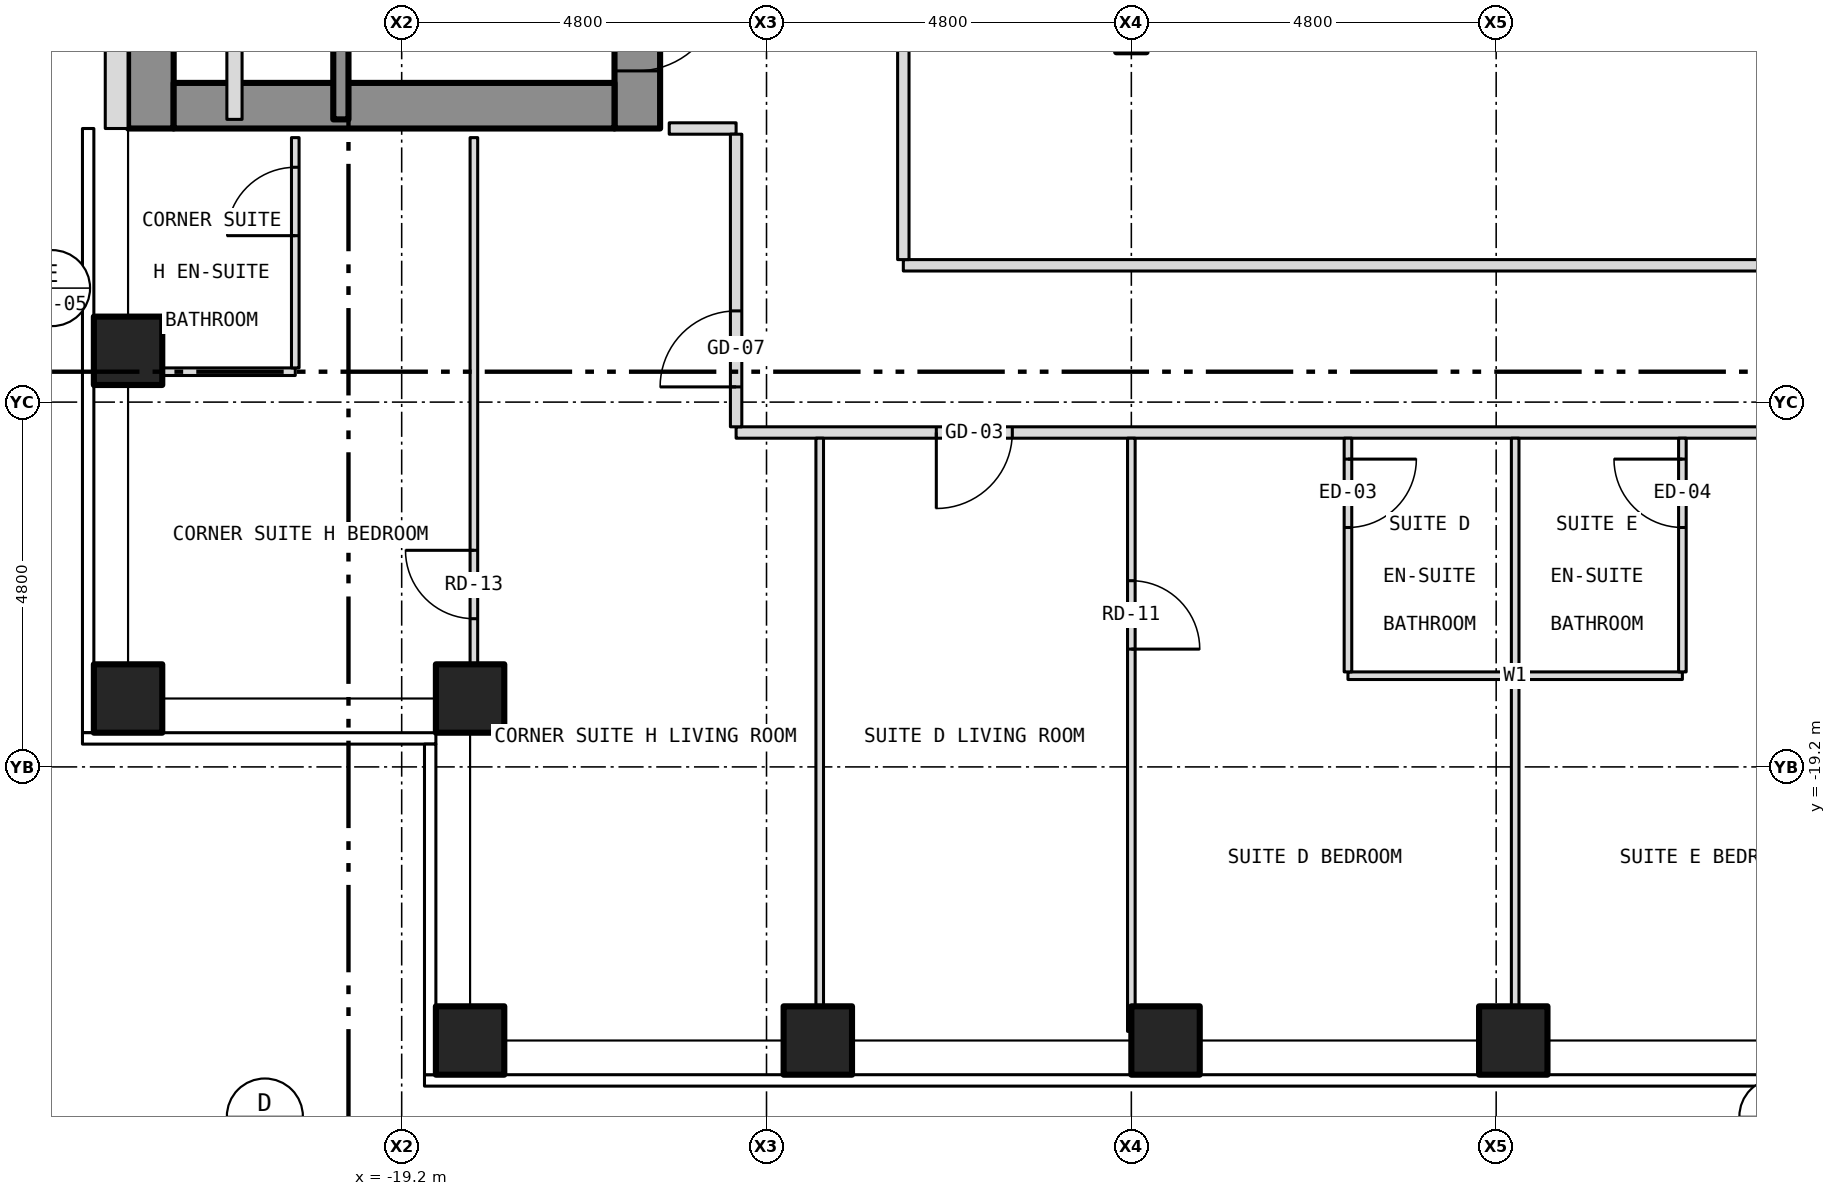
"""IFC4 building model, lengths in metres.
Left out: names, types, materials, properties, quantities, classifications, styles, units other than length and angle.
Written with IfcOpenShell. Run it as: python <this file> out.ifc"""

import sys

from ifc_helpers import new_model, si_unit, direction, frame, frame_2d, origin, origin_2d, place, context, subcontext, project, spatial, rectangle, hollow_rectangle, extrude, element, fill, save


model = new_model("IFC4")
c1 = context("Model", 3, precision=1e-05, world=origin(), true_north=direction((0.0, 1.0)))
c2 = subcontext(c1, "Body", "Model", "MODEL_VIEW")
j1 = project(units=[si_unit("LENGTHUNIT", "METRE"), si_unit("PLANEANGLEUNIT", "RADIAN")], contexts=[c1])
p1 = place(None, origin())
s1 = spatial("IfcSite", under=j1, at=p1, CompositionType="ELEMENT")
p2 = place(p1, origin())
s2 = spatial("IfcBuilding", under=s1, at=p2, CompositionType="ELEMENT")
p3 = place(p2, frame((0.0, 0.0, 103.0)))
s3 = spatial("IfcBuildingStorey", under=s2, at=p3, CompositionType="ELEMENT", Elevation=103.0)
for number, where, z_axis, x_axis in (
    (1, (-18.3, -22.8, -0.15), (0.0, 0.0, 1.0), (1.0, 0.0, 0.0)),
    (2, (-13.725, -22.8, -0.15), (0.0, 0.0, 1.0), (1.0, 0.0, 0.0)),
    (3, (-9.15, -22.8, -0.15), (0.0, 0.0, 1.0), (1.0, 0.0, 0.0)),
    (4, (-4.575, -22.8, -0.15), (0.0, 0.0, 1.0), (1.0, 0.0, 0.0)),
    (5, (-22.8, -18.3, -0.15), (0.0, 0.0, 1.0), (1.0, 0.0, 0.0)),
    (6, (-22.8, -13.725, -0.15), (0.0, 0.0, 1.0), (1.0, 0.0, 0.0)),
    (7, (-18.3, -18.3, -0.15), (0.0, 0.0, 1.0), (1.0, 0.0, 0.0)),
):
    element("IfcColumn", number, at=place(p3, frame(where, z_axis=z_axis, x_axis=x_axis)), inside=s3, PredefinedType="COLUMN", context=c2, shape_type="SweptSolid", body=[
        extrude(hollow_rectangle(XDim=0.9, YDim=0.9, WallThickness=0.05, at=origin_2d()), origin(), (0.0, 0.0, 1.0), 3.5),
    ])
p4 = place(p3, frame((-16.1, -10.8, 0.0), z_axis=(0.0, 0.0, 1.0), x_axis=(0.0, 1.0, 0.0)))
e8 = element("IfcWall", 8, at=p4, inside=s3, PredefinedType="SHEAR", context=c2, shape_type="SweptSolid", body=[
    extrude(rectangle(XDim=21.6, YDim=0.6, at=frame_2d((10.8, 0.0))), origin(), (0.0, 0.0, 1.0), 3.25),
])
p5 = place(p4, frame((9.4, 0.0, 0.0)))
e9 = element("IfcOpeningElement", 9, at=p5, cuts=e8, PredefinedType="OPENING", context=c2, shape_type="SweptSolid", body=[
    extrude(rectangle(XDim=1.1, YDim=2.1, at=frame_2d((0.55, 1.05))), frame((0.0, 0.312, 0.0), z_axis=(0.0, -1.0, 0.0), x_axis=(1.0, 0.0, 0.0)), (0.0, 0.0, 1.0), 0.624),
])
p6 = place(p4, frame((11.5, 0.0, 0.0)))
e10 = element("IfcOpeningElement", 10, at=p6, cuts=e8, PredefinedType="OPENING", context=c2, shape_type="SweptSolid", body=[
    extrude(rectangle(XDim=1.1, YDim=2.1, at=frame_2d((0.55, 1.05))), frame((0.0, 0.312, 0.0), z_axis=(0.0, -1.0, 0.0), x_axis=(1.0, 0.0, 0.0)), (0.0, 0.0, 1.0), 0.624),
])
p7 = place(p4, frame((13.6, 0.0, 0.0)))
e11 = element("IfcOpeningElement", 11, at=p7, cuts=e8, PredefinedType="OPENING", context=c2, shape_type="SweptSolid", body=[
    extrude(rectangle(XDim=1.1, YDim=2.1, at=frame_2d((0.55, 1.05))), frame((0.0, 0.312, 0.0), z_axis=(0.0, -1.0, 0.0), x_axis=(1.0, 0.0, 0.0)), (0.0, 0.0, 1.0), 0.624),
])
p8 = place(p4, frame((15.7, 0.0, 0.0)))
e12 = element("IfcOpeningElement", 12, at=p8, cuts=e8, PredefinedType="OPENING", context=c2, shape_type="SweptSolid", body=[
    extrude(rectangle(XDim=1.1, YDim=2.1, at=frame_2d((0.55, 1.05))), frame((0.0, 0.312, 0.0), z_axis=(0.0, -1.0, 0.0), x_axis=(1.0, 0.0, 0.0)), (0.0, 0.0, 1.0), 0.624),
])
p9 = place(p4, frame((17.8, 0.0, 0.0)))
e13 = element("IfcOpeningElement", 13, at=p9, cuts=e8, PredefinedType="OPENING", context=c2, shape_type="SweptSolid", body=[
    extrude(rectangle(XDim=1.1, YDim=2.1, at=frame_2d((0.55, 1.05))), frame((0.0, 0.312, 0.0), z_axis=(0.0, -1.0, 0.0), x_axis=(1.0, 0.0, 0.0)), (0.0, 0.0, 1.0), 0.624),
])
p10 = place(p4, frame((0.758, 0.0, 0.0)))
e14 = element("IfcOpeningElement", 14, at=p10, cuts=e8, PredefinedType="OPENING", context=c2, shape_type="SweptSolid", body=[
    extrude(rectangle(XDim=1.1, YDim=2.1, at=frame_2d((0.55, 1.05))), frame((0.0, 0.312, 0.0), z_axis=(0.0, -1.0, 0.0), x_axis=(1.0, 0.0, 0.0)), (0.0, 0.0, 1.0), 0.624),
])
p11 = place(p4, frame((7.5, 0.0, 0.0)))
e15 = element("IfcOpeningElement", 15, at=p11, cuts=e8, PredefinedType="OPENING", context=c2, shape_type="SweptSolid", body=[
    extrude(rectangle(XDim=1.1, YDim=2.1, at=frame_2d((0.55, 1.05))), frame((0.0, 0.312, 0.0), z_axis=(0.0, -1.0, 0.0), x_axis=(1.0, 0.0, 0.0)), (0.0, 0.0, 1.0), 0.624),
])
p12 = place(p3, frame((-22.5, -10.8, 0.0), z_axis=(0.0, 0.0, 1.0), x_axis=(0.0, 1.0, 0.0)))
e16 = element("IfcWall", 16, at=p12, inside=s3, PredefinedType="SHEAR", context=c2, shape_type="SweptSolid", body=[
    extrude(rectangle(XDim=21.6, YDim=0.6, at=frame_2d((10.8, 0.0))), origin(), (0.0, 0.0, 1.0), 3.25),
])
p13 = place(p3, frame((-22.2, -10.5, 0.0), z_axis=(0.0, 0.0, 1.0), x_axis=(1.0, 0.0, 0.0)))
e17 = element("IfcWall", 17, at=p13, inside=s3, PredefinedType="SHEAR", context=c2, shape_type="SweptSolid", body=[
    extrude(rectangle(XDim=5.8, YDim=0.6, at=frame_2d((2.9, 0.0))), origin(), (0.0, 0.0, 1.0), 3.25),
])
p14 = place(p3, frame((-22.95, 10.8, 0.0), z_axis=(0.0, 0.0, 1.0), x_axis=(0.0, -1.0, 0.0)))
e18 = element("IfcWall", 18, at=p14, inside=s3, PredefinedType="SOLIDWALL", context=c2, shape_type="SweptSolid", body=[
    extrude(rectangle(XDim=21.6, YDim=0.3, at=frame_2d((10.8, 0.0))), origin(), (0.0, 0.0, 1.0), 3.5),
])
p15 = place(p14, frame((18.05, 0.0, 1.0)))
e19 = element("IfcOpeningElement", 19, at=p15, cuts=e18, PredefinedType="OPENING", context=c2, shape_type="SweptSolid", body=[
    extrude(rectangle(XDim=0.6, YDim=1.5, at=frame_2d((0.3, 0.75))), frame((0.0, 0.162, 0.0), z_axis=(0.0, -1.0, 0.0), x_axis=(1.0, 0.0, 0.0)), (0.0, 0.0, 1.0), 0.324),
])
p16 = place(p3, frame((-6.75, -18.0, 0.0), z_axis=(0.0, 0.0, 1.0), x_axis=(1.0, 0.0, 0.0)))
e20 = element("IfcWall", 20, at=p16, inside=s3, PredefinedType="PARTITIONING", context=c2, shape_type="SweptSolid", body=[
    extrude(rectangle(XDim=4.4, YDim=0.1, at=frame_2d((2.2, 0.0))), origin(), (0.0, 0.0, 1.0), 3.35),
])
p17 = place(p3, frame((-14.8, -14.8, 0.0), z_axis=(0.0, 0.0, 1.0), x_axis=(1.0, 0.0, 0.0)))
e21 = element("IfcWall", 21, at=p17, inside=s3, PredefinedType="PARTITIONING", context=c2, shape_type="SweptSolid", body=[
    extrude(rectangle(XDim=29.6, YDim=0.15, at=frame_2d((14.8, 0.0))), origin(), (0.0, 0.0, 1.0), 3.35),
])
p18 = place(p17, frame((2.634, 0.0, 0.0)))
e22 = element("IfcOpeningElement", 22, at=p18, cuts=e21, PredefinedType="OPENING", context=c2, shape_type="SweptSolid", body=[
    extrude(rectangle(XDim=1.0, YDim=2.1, at=frame_2d((0.5, 1.05))), frame((0.0, 0.087, 0.0), z_axis=(0.0, -1.0, 0.0), x_axis=(1.0, 0.0, 0.0)), (0.0, 0.0, 1.0), 0.174),
])
p19 = place(p17, frame((16.816, 0.0, 0.0)))
e23 = element("IfcOpeningElement", 23, at=p19, cuts=e21, PredefinedType="OPENING", context=c2, shape_type="SweptSolid", body=[
    extrude(rectangle(XDim=1.0, YDim=2.1, at=frame_2d((0.5, 1.05))), frame((0.0, 0.087, 0.0), z_axis=(0.0, -1.0, 0.0), x_axis=(1.0, 0.0, 0.0)), (0.0, 0.0, 1.0), 0.174),
])
p20 = place(p17, frame((22.263, 0.0, 0.0)))
e24 = element("IfcOpeningElement", 24, at=p20, cuts=e21, PredefinedType="OPENING", context=c2, shape_type="SweptSolid", body=[
    extrude(rectangle(XDim=1.0, YDim=2.1, at=frame_2d((0.5, 1.05))), frame((0.0, 0.087, 0.0), z_axis=(0.0, -1.0, 0.0), x_axis=(1.0, 0.0, 0.0)), (0.0, 0.0, 1.0), 0.174),
])
p21 = place(p17, frame((26.837, 0.0, 0.0)))
e25 = element("IfcOpeningElement", 25, at=p21, cuts=e21, PredefinedType="OPENING", context=c2, shape_type="SweptSolid", body=[
    extrude(rectangle(XDim=1.0, YDim=2.1, at=frame_2d((0.5, 1.05))), frame((0.0, 0.087, 0.0), z_axis=(0.0, -1.0, 0.0), x_axis=(1.0, 0.0, 0.0)), (0.0, 0.0, 1.0), 0.174),
])
p22 = place(p3, frame((-22.68, -14.0, 0.0), z_axis=(0.0, 0.0, 1.0), x_axis=(1.0, 0.0, 0.0)))
e26 = element("IfcWall", 26, at=p22, inside=s3, PredefinedType="PARTITIONING", context=c2, shape_type="SweptSolid", body=[
    extrude(rectangle(XDim=2.08, YDim=0.1, at=frame_2d((1.04, 0.0))), origin(), (0.0, 0.0, 1.0), 3.35),
])
p23 = place(p3, frame((-12.6, -12.6, 0.0), z_axis=(0.0, 0.0, 1.0), x_axis=(1.0, 0.0, 0.0)))
e27 = element("IfcWall", 27, at=p23, inside=s3, PredefinedType="PARTITIONING", context=c2, shape_type="SweptSolid", body=[
    extrude(rectangle(XDim=25.2, YDim=0.15, at=frame_2d((12.6, 0.0))), origin(), (0.0, 0.0, 1.0), 3.35),
])
p24 = place(p23, frame((12.15, 0.0, 0.0)))
e28 = element("IfcOpeningElement", 28, at=p24, cuts=e27, PredefinedType="OPENING", context=c2, shape_type="SweptSolid", body=[
    extrude(rectangle(XDim=0.9, YDim=2.1, at=frame_2d((0.45, 1.05))), frame((0.0, 0.087, 0.0), z_axis=(0.0, -1.0, 0.0), x_axis=(1.0, 0.0, 0.0)), (0.0, 0.0, 1.0), 0.174),
])
p25 = place(p3, frame((-15.68, -10.8, 0.0), z_axis=(0.0, 0.0, 1.0), x_axis=(1.0, 0.0, 0.0)))
e29 = element("IfcWall", 29, at=p25, inside=s3, PredefinedType="PARTITIONING", context=c2, shape_type="SweptSolid", body=[
    extrude(rectangle(XDim=0.88, YDim=0.15, at=frame_2d((0.44, 0.0))), origin(), (0.0, 0.0, 1.0), 3.35),
])
p26 = place(p3, frame((-21.4, -10.68, 0.0), z_axis=(0.0, 0.0, 1.0), x_axis=(0.0, 1.0, 0.0)))
e30 = element("IfcWall", 30, at=p26, inside=s3, PredefinedType="PARTITIONING", context=c2, shape_type="SweptSolid", body=[
    extrude(rectangle(XDim=8.68, YDim=0.2, at=frame_2d((4.34, 0.0))), origin(), (0.0, 0.0, 1.0), 3.25),
])
p27 = place(p26, frame((3.88, 0.0, 0.0)))
e31 = element("IfcOpeningElement", 31, at=p27, cuts=e30, PredefinedType="OPENING", context=c2, shape_type="SweptSolid", body=[
    extrude(rectangle(XDim=0.9, YDim=2.1, at=frame_2d((0.45, 1.05))), frame((0.0, 0.112, 0.0), z_axis=(0.0, -1.0, 0.0), x_axis=(1.0, 0.0, 0.0)), (0.0, 0.0, 1.0), 0.224),
])
p28 = place(p3, frame((-20.6, -13.95, 0.0), z_axis=(0.0, 0.0, 1.0), x_axis=(0.0, 1.0, 0.0)))
e32 = element("IfcWall", 32, at=p28, inside=s3, PredefinedType="PARTITIONING", context=c2, shape_type="SweptSolid", body=[
    extrude(rectangle(XDim=3.03, YDim=0.1, at=frame_2d((1.515, 0.0))), origin(), (0.0, 0.0, 1.0), 3.35),
])
p29 = place(p28, frame((1.74, 0.0, 0.0)))
e33 = element("IfcOpeningElement", 33, at=p29, cuts=e32, PredefinedType="OPENING", context=c2, shape_type="SweptSolid", body=[
    extrude(rectangle(XDim=0.9, YDim=2.1, at=frame_2d((0.45, 1.05))), frame((0.0, 0.062, 0.0), z_axis=(0.0, -1.0, 0.0), x_axis=(1.0, 0.0, 0.0)), (0.0, 0.0, 1.0), 0.124),
])
p30 = place(p3, frame((-20.0, -10.68, 0.0), z_axis=(0.0, 0.0, 1.0), x_axis=(0.0, 1.0, 0.0)))
e34 = element("IfcWall", 34, at=p30, inside=s3, PredefinedType="SHEAR", context=c2, shape_type="SweptSolid", body=[
    extrude(rectangle(XDim=6.98, YDim=0.2, at=frame_2d((3.49, 0.0))), origin(), (0.0, 0.0, 1.0), 3.25),
])
p31 = place(p3, frame((-18.25, -18.191, 0.0), z_axis=(0.0, 0.0, 1.0), x_axis=(0.0, 1.0, 0.0)))
e35 = element("IfcWall", 35, at=p31, inside=s3, PredefinedType="PARTITIONING", context=c2, shape_type="SweptSolid", body=[
    extrude(rectangle(XDim=7.271, YDim=0.1, at=frame_2d((3.635, 0.0))), origin(), (0.0, 0.0, 1.0), 3.35),
])
p32 = place(p31, frame((0.941, 0.0, 0.0)))
e36 = element("IfcOpeningElement", 36, at=p32, cuts=e35, PredefinedType="OPENING", context=c2, shape_type="SweptSolid", body=[
    extrude(rectangle(XDim=0.9, YDim=2.1, at=frame_2d((0.45, 1.05))), frame((0.0, 0.062, 0.0), z_axis=(0.0, -1.0, 0.0), x_axis=(1.0, 0.0, 0.0)), (0.0, 0.0, 1.0), 0.124),
])
p33 = place(p3, frame((-14.8, -14.725, 0.0), z_axis=(0.0, 0.0, 1.0), x_axis=(0.0, 1.0, 0.0)))
e37 = element("IfcWall", 37, at=p33, inside=s3, PredefinedType="PARTITIONING", context=c2, shape_type="SweptSolid", body=[
    extrude(rectangle(XDim=3.85, YDim=0.15, at=frame_2d((1.925, 0.0))), origin(), (0.0, 0.0, 1.0), 3.35),
])
p34 = place(p33, frame((0.525, 0.0, 0.0)))
e38 = element("IfcOpeningElement", 38, at=p34, cuts=e37, PredefinedType="OPENING", context=c2, shape_type="SweptSolid", body=[
    extrude(rectangle(XDim=1.0, YDim=2.1, at=frame_2d((0.5, 1.05))), frame((0.0, 0.087, 0.0), z_axis=(0.0, -1.0, 0.0), x_axis=(1.0, 0.0, 0.0)), (0.0, 0.0, 1.0), 0.174),
])
p35 = place(p3, frame((-13.7, -22.68, 0.0), z_axis=(0.0, 0.0, 1.0), x_axis=(0.0, 1.0, 0.0)))
e39 = element("IfcWall", 39, at=p35, inside=s3, PredefinedType="PARTITIONING", context=c2, shape_type="SweptSolid", body=[
    extrude(rectangle(XDim=7.805, YDim=0.1, at=frame_2d((3.902, 0.0))), origin(), (0.0, 0.0, 1.0), 3.35),
])
p36 = place(p3, frame((-12.6, -12.525, 0.0), z_axis=(0.0, 0.0, 1.0), x_axis=(0.0, 1.0, 0.0)))
e40 = element("IfcWall", 40, at=p36, inside=s3, PredefinedType="PARTITIONING", context=c2, shape_type="SweptSolid", body=[
    extrude(rectangle(XDim=10.525, YDim=0.15, at=frame_2d((5.262, 0.0))), origin(), (0.0, 0.0, 1.0), 3.35),
])
p37 = place(p3, frame((-9.6, -22.68, 0.0), z_axis=(0.0, 0.0, 1.0), x_axis=(0.0, 1.0, 0.0)))
e41 = element("IfcWall", 41, at=p37, inside=s3, PredefinedType="PARTITIONING", context=c2, shape_type="SweptSolid", body=[
    extrude(rectangle(XDim=0.33, YDim=0.1, at=frame_2d((0.165, 0.0))), origin(), (0.0, 0.0, 1.0), 3.35),
])
p38 = place(p3, frame((-9.6, -22.35, 0.0), z_axis=(0.0, 0.0, 1.0), x_axis=(0.0, 1.0, 0.0)))
e42 = element("IfcWall", 42, at=p38, inside=s3, PredefinedType="PARTITIONING", context=c2, shape_type="SweptSolid", body=[
    extrude(rectangle(XDim=7.475, YDim=0.1, at=frame_2d((3.738, 0.0))), origin(), (0.0, 0.0, 1.0), 2.728),
])
p39 = place(p38, frame((4.7, 0.0, 0.0)))
e43 = element("IfcOpeningElement", 43, at=p39, cuts=e42, PredefinedType="OPENING", context=c2, shape_type="SweptSolid", body=[
    extrude(rectangle(XDim=0.9, YDim=2.1, at=frame_2d((0.45, 1.05))), frame((0.0, 0.062, 0.0), z_axis=(0.0, -1.0, 0.0), x_axis=(1.0, 0.0, 0.0)), (0.0, 0.0, 1.0), 0.124),
])
p40 = place(p3, frame((-6.75, -17.95, 0.0), z_axis=(0.0, 0.0, 1.0), x_axis=(0.0, 1.0, 0.0)))
e44 = element("IfcWall", 44, at=p40, inside=s3, PredefinedType="PARTITIONING", context=c2, shape_type="SweptSolid", body=[
    extrude(rectangle(XDim=3.075, YDim=0.1, at=frame_2d((1.538, 0.0))), origin(), (0.0, 0.0, 1.0), 3.35),
])
p41 = place(p40, frame((1.9, 0.0, 0.0)))
e45 = element("IfcOpeningElement", 45, at=p41, cuts=e44, PredefinedType="OPENING", context=c2, shape_type="SweptSolid", body=[
    extrude(rectangle(XDim=0.9, YDim=2.1, at=frame_2d((0.45, 1.05))), frame((0.0, 0.062, 0.0), z_axis=(0.0, -1.0, 0.0), x_axis=(1.0, 0.0, 0.0)), (0.0, 0.0, 1.0), 0.124),
])
p42 = place(p3, frame((-4.55, -22.68, 0.0), z_axis=(0.0, 0.0, 1.0), x_axis=(0.0, 1.0, 0.0)))
e46 = element("IfcWall", 46, at=p42, inside=s3, PredefinedType="PARTITIONING", context=c2, shape_type="SweptSolid", body=[
    extrude(rectangle(XDim=4.63, YDim=0.1, at=frame_2d((2.315, 0.0))), origin(), (0.0, 0.0, 1.0), 3.35),
])
p43 = place(p3, frame((-4.55, -17.95, 0.0), z_axis=(0.0, 0.0, 1.0), x_axis=(0.0, 1.0, 0.0)))
e47 = element("IfcWall", 47, at=p43, inside=s3, PredefinedType="PARTITIONING", context=c2, shape_type="SweptSolid", body=[
    extrude(rectangle(XDim=3.075, YDim=0.1, at=frame_2d((1.538, 0.0))), origin(), (0.0, 0.0, 1.0), 3.35),
])
p44 = place(p3, frame((-2.35, -17.95, 0.0), z_axis=(0.0, 0.0, 1.0), x_axis=(0.0, 1.0, 0.0)))
e48 = element("IfcWall", 48, at=p44, inside=s3, PredefinedType="PARTITIONING", context=c2, shape_type="SweptSolid", body=[
    extrude(rectangle(XDim=3.075, YDim=0.1, at=frame_2d((1.538, 0.0))), origin(), (0.0, 0.0, 1.0), 3.35),
])
p45 = place(p44, frame((1.9, 0.0, 0.0)))
e49 = element("IfcOpeningElement", 49, at=p45, cuts=e48, PredefinedType="OPENING", context=c2, shape_type="SweptSolid", body=[
    extrude(rectangle(XDim=0.9, YDim=2.1, at=frame_2d((0.45, 1.05))), frame((0.0, 0.062, 0.0), z_axis=(0.0, -1.0, 0.0), x_axis=(1.0, 0.0, 0.0)), (0.0, 0.0, 1.0), 0.124),
])
p46 = place(p10, origin())
e50 = element("IfcDoor", 50, at=p46, inside=s3, OperationType="SINGLE_SWING_RIGHT", PredefinedType="DOOR", context=c2, shape_type="SweptSolid", body=[
    extrude(rectangle(XDim=1.1, YDim=2.1, at=frame_2d((0.55, 1.05))), frame((0.0, 0.025, 0.0), z_axis=(0.0, -1.0, 0.0), x_axis=(1.0, 0.0, 0.0)), (0.0, 0.0, 1.0), 0.05),
])
fill(e14, e50)
p47 = place(p18, origin())
e51 = element("IfcDoor", 51, at=p47, inside=s3, OperationType="SINGLE_SWING_LEFT", PredefinedType="DOOR", context=c2, shape_type="SweptSolid", body=[
    extrude(rectangle(XDim=1.0, YDim=2.1, at=frame_2d((0.5, 1.05))), frame((0.0, 0.025, 0.0), z_axis=(0.0, -1.0, 0.0), x_axis=(1.0, 0.0, 0.0)), (0.0, 0.0, 1.0), 0.05),
])
fill(e22, e51)
p48 = place(p39, origin())
e52 = element("IfcDoor", 52, at=p48, inside=s3, OperationType="SINGLE_SWING_LEFT", PredefinedType="DOOR", context=c2, shape_type="SweptSolid", body=[
    extrude(rectangle(XDim=0.9, YDim=2.1, at=frame_2d((0.45, 1.05))), frame((0.0, 0.025, 0.0), z_axis=(0.0, -1.0, 0.0), x_axis=(1.0, 0.0, 0.0)), (0.0, 0.0, 1.0), 0.05),
])
fill(e43, e52)
p49 = place(p41, origin())
e53 = element("IfcDoor", 53, at=p49, inside=s3, OperationType="SINGLE_SWING_RIGHT", PredefinedType="DOOR", context=c2, shape_type="SweptSolid", body=[
    extrude(rectangle(XDim=0.9, YDim=2.1, at=frame_2d((0.45, 1.05))), frame((0.0, 0.025, 0.0), z_axis=(0.0, -1.0, 0.0), x_axis=(1.0, 0.0, 0.0)), (0.0, 0.0, 1.0), 0.05),
])
fill(e45, e53)
p50 = place(p45, origin())
e54 = element("IfcDoor", 54, at=p50, inside=s3, OperationType="SINGLE_SWING_RIGHT", PredefinedType="DOOR", context=c2, shape_type="SweptSolid", body=[
    extrude(rectangle(XDim=0.9, YDim=2.1, at=frame_2d((0.45, 1.05))), frame((0.0, 0.025, 0.0), z_axis=(0.0, -1.0, 0.0), x_axis=(1.0, 0.0, 0.0)), (0.0, 0.0, 1.0), 0.05),
])
fill(e49, e54)
p51 = place(p34, origin())
e55 = element("IfcDoor", 55, at=p51, inside=s3, OperationType="SINGLE_SWING_LEFT", PredefinedType="DOOR", context=c2, shape_type="SweptSolid", body=[
    extrude(rectangle(XDim=1.0, YDim=2.1, at=frame_2d((0.5, 1.05))), frame((0.0, 0.025, 0.0), z_axis=(0.0, -1.0, 0.0), x_axis=(1.0, 0.0, 0.0)), (0.0, 0.0, 1.0), 0.05),
])
fill(e38, e55)
p52 = place(p32, origin())
e56 = element("IfcDoor", 56, at=p52, inside=s3, OperationType="SINGLE_SWING_RIGHT", PredefinedType="DOOR", context=c2, shape_type="SweptSolid", body=[
    extrude(rectangle(XDim=0.9, YDim=2.1, at=frame_2d((0.45, 1.05))), frame((0.0, 0.025, 0.0), z_axis=(0.0, -1.0, 0.0), x_axis=(1.0, 0.0, 0.0)), (0.0, 0.0, 1.0), 0.05),
])
fill(e36, e56)
p53 = place(p29, origin())
e57 = element("IfcDoor", 57, at=p53, inside=s3, OperationType="SINGLE_SWING_LEFT", PredefinedType="DOOR", context=c2, shape_type="SweptSolid", body=[
    extrude(rectangle(XDim=0.9, YDim=2.1, at=frame_2d((0.45, 1.05))), frame((0.0, 0.025, 0.0), z_axis=(0.0, -1.0, 0.0), x_axis=(1.0, 0.0, 0.0)), (0.0, 0.0, 1.0), 0.05),
])
fill(e33, e57)
save(model, sys.argv[1])
